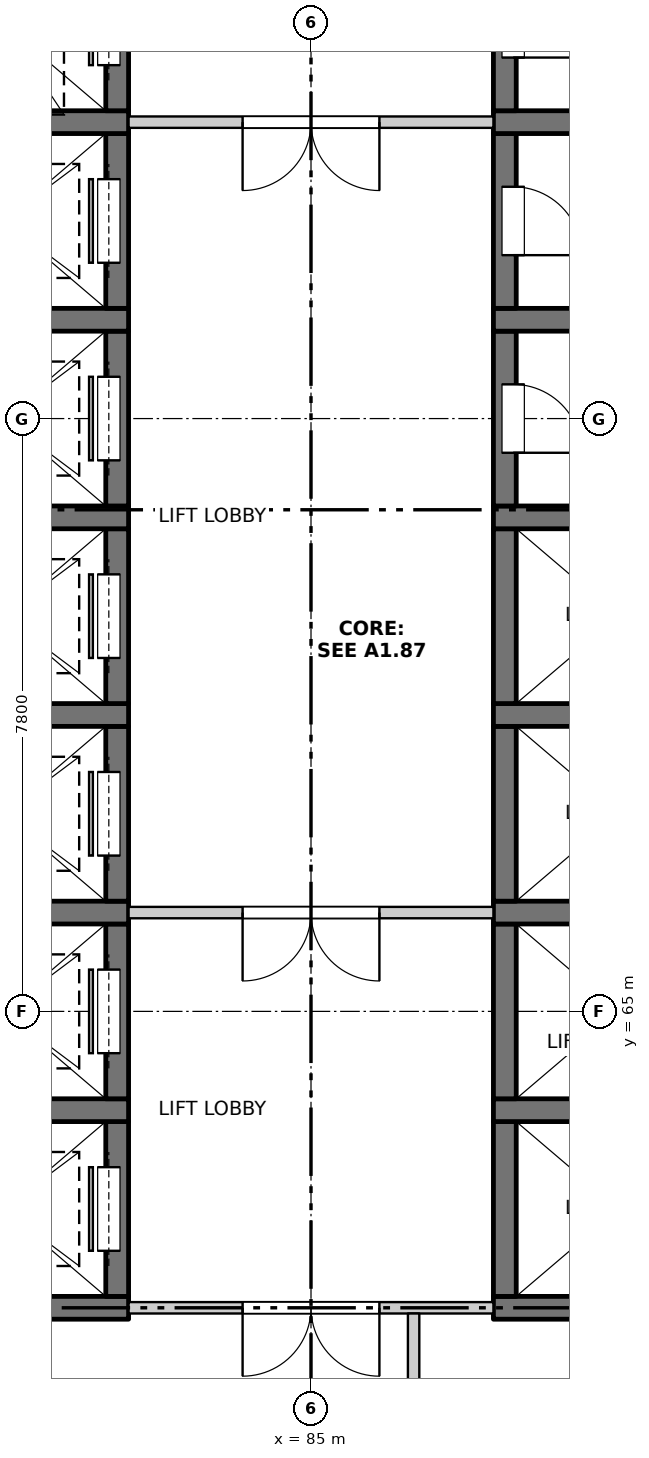
"""IFC4 building model, lengths in metres.
Left out: names, types, materials, properties, quantities, classifications, styles, units other than length and angle.
Written with IfcOpenShell. Run it as: python <this file> out.ifc"""

import sys

from ifc_helpers import new_model, si_unit, direction, frame, frame_2d, origin, place, context, subcontext, project, spatial, rectangle, extrude, element, fill, save


model = new_model("IFC4")
c1 = context("Model", 3, precision=1e-05, world=origin(), true_north=direction((0.0, 1.0)))
c2 = subcontext(c1, "Body", "Model", "MODEL_VIEW")
j1 = project(units=[si_unit("LENGTHUNIT", "METRE"), si_unit("PLANEANGLEUNIT", "RADIAN")], contexts=[c1])
p1 = place(None, origin())
s1 = spatial("IfcSite", under=j1, at=p1, CompositionType="ELEMENT")
p2 = place(p1, origin())
s2 = spatial("IfcBuilding", under=s1, at=p2, CompositionType="ELEMENT")
p3 = place(p2, frame((0.0, 0.0, 123.7)))
s3 = spatial("IfcBuildingStorey", under=s2, at=p3, CompositionType="ELEMENT", Elevation=123.7)
p4 = place(p3, frame((79.6, 61.1, -0.3), z_axis=(0.0, 0.0, 1.0), x_axis=(1.0, 0.0, 0.0)))
e1 = element("IfcWall", 1, at=p4, inside=s3, PredefinedType="SOLIDWALL", context=c2, shape_type="SweptSolid", body=[
    extrude(rectangle(XDim=3.0, YDim=0.3, at=frame_2d((1.5, 0.0))), origin(), (0.0, 0.0, 1.0), 3.45),
])
p5 = place(p3, frame((82.45, 61.25, -0.3), z_axis=(0.0, 0.0, 1.0), x_axis=(0.0, 1.0, 0.0)))
e2 = element("IfcWall", 2, at=p5, inside=s3, PredefinedType="SOLIDWALL", context=c2, shape_type="SweptSolid", body=[
    extrude(rectangle(XDim=2.3, YDim=0.3, at=frame_2d((1.15, 0.0))), origin(), (0.0, 0.0, 1.0), 3.45),
])
p6 = place(p5, frame((0.6, 0.0, 0.3)))
e3 = element("IfcOpeningElement", 3, at=p6, cuts=e2, PredefinedType="OPENING", context=c2, shape_type="SweptSolid", body=[
    extrude(rectangle(XDim=1.1, YDim=2.1, at=frame_2d((0.55, 1.05))), frame((0.0, 0.16, 0.0), z_axis=(0.0, -1.0, 0.0), x_axis=(1.0, 0.0, 0.0)), (0.0, 0.0, 1.0), 0.32),
])
p7 = place(p3, frame((79.6, 63.7, -0.3), z_axis=(0.0, 0.0, 1.0), x_axis=(1.0, 0.0, 0.0)))
e4 = element("IfcWall", 4, at=p7, inside=s3, PredefinedType="SOLIDWALL", context=c2, shape_type="SweptSolid", body=[
    extrude(rectangle(XDim=3.0, YDim=0.3, at=frame_2d((1.5, 0.0))), origin(), (0.0, 0.0, 1.0), 3.45),
])
p8 = place(p3, frame((82.45, 63.85, -0.3), z_axis=(0.0, 0.0, 1.0), x_axis=(0.0, 1.0, 0.0)))
e5 = element("IfcWall", 5, at=p8, inside=s3, PredefinedType="SOLIDWALL", context=c2, shape_type="SweptSolid", body=[
    extrude(rectangle(XDim=2.3, YDim=0.3, at=frame_2d((1.15, 0.0))), origin(), (0.0, 0.0, 1.0), 3.45),
])
p9 = place(p8, frame((0.6, 0.0, 0.3)))
e6 = element("IfcOpeningElement", 6, at=p9, cuts=e5, PredefinedType="OPENING", context=c2, shape_type="SweptSolid", body=[
    extrude(rectangle(XDim=1.1, YDim=2.1, at=frame_2d((0.55, 1.05))), frame((0.0, 0.16, 0.0), z_axis=(0.0, -1.0, 0.0), x_axis=(1.0, 0.0, 0.0)), (0.0, 0.0, 1.0), 0.32),
])
p10 = place(p3, frame((79.6, 66.3, -0.3), z_axis=(0.0, 0.0, 1.0), x_axis=(1.0, 0.0, 0.0)))
e7 = element("IfcWall", 7, at=p10, inside=s3, PredefinedType="SOLIDWALL", context=c2, shape_type="SweptSolid", body=[
    extrude(rectangle(XDim=3.0, YDim=0.3, at=frame_2d((1.5, 0.0))), origin(), (0.0, 0.0, 1.0), 3.45),
])
p11 = place(p3, frame((82.45, 66.45, -0.3), z_axis=(0.0, 0.0, 1.0), x_axis=(0.0, 1.0, 0.0)))
e8 = element("IfcWall", 8, at=p11, inside=s3, PredefinedType="SOLIDWALL", context=c2, shape_type="SweptSolid", body=[
    extrude(rectangle(XDim=2.3, YDim=0.3, at=frame_2d((1.15, 0.0))), origin(), (0.0, 0.0, 1.0), 3.45),
])
p12 = place(p11, frame((0.6, 0.0, 0.3)))
e9 = element("IfcOpeningElement", 9, at=p12, cuts=e8, PredefinedType="OPENING", context=c2, shape_type="SweptSolid", body=[
    extrude(rectangle(XDim=1.1, YDim=2.1, at=frame_2d((0.55, 1.05))), frame((0.0, 0.16, 0.0), z_axis=(0.0, -1.0, 0.0), x_axis=(1.0, 0.0, 0.0)), (0.0, 0.0, 1.0), 0.32),
])
p13 = place(p3, frame((79.6, 68.9, -0.3), z_axis=(0.0, 0.0, 1.0), x_axis=(1.0, 0.0, 0.0)))
e10 = element("IfcWall", 10, at=p13, inside=s3, PredefinedType="SOLIDWALL", context=c2, shape_type="SweptSolid", body=[
    extrude(rectangle(XDim=3.0, YDim=0.3, at=frame_2d((1.5, 0.0))), origin(), (0.0, 0.0, 1.0), 3.45),
])
p14 = place(p3, frame((82.45, 69.05, -0.3), z_axis=(0.0, 0.0, 1.0), x_axis=(0.0, 1.0, 0.0)))
e11 = element("IfcWall", 11, at=p14, inside=s3, PredefinedType="SOLIDWALL", context=c2, shape_type="SweptSolid", body=[
    extrude(rectangle(XDim=2.3, YDim=0.3, at=frame_2d((1.15, 0.0))), origin(), (0.0, 0.0, 1.0), 3.45),
])
p15 = place(p14, frame((0.6, 0.0, 0.3)))
e12 = element("IfcOpeningElement", 12, at=p15, cuts=e11, PredefinedType="OPENING", context=c2, shape_type="SweptSolid", body=[
    extrude(rectangle(XDim=1.1, YDim=2.1, at=frame_2d((0.55, 1.05))), frame((0.0, 0.16, 0.0), z_axis=(0.0, -1.0, 0.0), x_axis=(1.0, 0.0, 0.0)), (0.0, 0.0, 1.0), 0.32),
])
p16 = place(p3, frame((79.6, 71.5, -0.3), z_axis=(0.0, 0.0, 1.0), x_axis=(1.0, 0.0, 0.0)))
e13 = element("IfcWall", 13, at=p16, inside=s3, PredefinedType="SOLIDWALL", context=c2, shape_type="SweptSolid", body=[
    extrude(rectangle(XDim=3.0, YDim=0.3, at=frame_2d((1.5, 0.0))), origin(), (0.0, 0.0, 1.0), 3.45),
])
p17 = place(p3, frame((82.45, 71.65, -0.3), z_axis=(0.0, 0.0, 1.0), x_axis=(0.0, 1.0, 0.0)))
e14 = element("IfcWall", 14, at=p17, inside=s3, PredefinedType="SOLIDWALL", context=c2, shape_type="SweptSolid", body=[
    extrude(rectangle(XDim=2.3, YDim=0.3, at=frame_2d((1.15, 0.0))), origin(), (0.0, 0.0, 1.0), 3.45),
])
p18 = place(p17, frame((0.6, 0.0, 0.3)))
e15 = element("IfcOpeningElement", 15, at=p18, cuts=e14, PredefinedType="OPENING", context=c2, shape_type="SweptSolid", body=[
    extrude(rectangle(XDim=1.1, YDim=2.1, at=frame_2d((0.55, 1.05))), frame((0.0, 0.16, 0.0), z_axis=(0.0, -1.0, 0.0), x_axis=(1.0, 0.0, 0.0)), (0.0, 0.0, 1.0), 0.32),
])
p19 = place(p3, frame((79.6, 74.1, -0.3), z_axis=(0.0, 0.0, 1.0), x_axis=(1.0, 0.0, 0.0)))
e16 = element("IfcWall", 16, at=p19, inside=s3, PredefinedType="SOLIDWALL", context=c2, shape_type="SweptSolid", body=[
    extrude(rectangle(XDim=3.0, YDim=0.3, at=frame_2d((1.5, 0.0))), origin(), (0.0, 0.0, 1.0), 3.45),
])
p20 = place(p3, frame((82.45, 74.25, -0.3), z_axis=(0.0, 0.0, 1.0), x_axis=(0.0, 1.0, 0.0)))
e17 = element("IfcWall", 17, at=p20, inside=s3, PredefinedType="SOLIDWALL", context=c2, shape_type="SweptSolid", body=[
    extrude(rectangle(XDim=2.3, YDim=0.3, at=frame_2d((1.15, 0.0))), origin(), (0.0, 0.0, 1.0), 3.45),
])
p21 = place(p20, frame((0.6, 0.0, 0.3)))
e18 = element("IfcOpeningElement", 18, at=p21, cuts=e17, PredefinedType="OPENING", context=c2, shape_type="SweptSolid", body=[
    extrude(rectangle(XDim=1.1, YDim=2.1, at=frame_2d((0.55, 1.05))), frame((0.0, 0.16, 0.0), z_axis=(0.0, -1.0, 0.0), x_axis=(1.0, 0.0, 0.0)), (0.0, 0.0, 1.0), 0.32),
])
p22 = place(p3, frame((79.6, 76.7, -0.3), z_axis=(0.0, 0.0, 1.0), x_axis=(1.0, 0.0, 0.0)))
e19 = element("IfcWall", 19, at=p22, inside=s3, PredefinedType="SOLIDWALL", context=c2, shape_type="SweptSolid", body=[
    extrude(rectangle(XDim=3.0, YDim=0.3, at=frame_2d((1.5, 0.0))), origin(), (0.0, 0.0, 1.0), 3.45),
])
p23 = place(p3, frame((82.45, 76.85, -0.3), z_axis=(0.0, 0.0, 1.0), x_axis=(0.0, 1.0, 0.0)))
e20 = element("IfcWall", 20, at=p23, inside=s3, PredefinedType="SOLIDWALL", context=c2, shape_type="SweptSolid", body=[
    extrude(rectangle(XDim=2.3, YDim=0.3, at=frame_2d((1.15, 0.0))), origin(), (0.0, 0.0, 1.0), 3.45),
])
p24 = place(p23, frame((0.6, 0.0, 0.3)))
e21 = element("IfcOpeningElement", 21, at=p24, cuts=e20, PredefinedType="OPENING", context=c2, shape_type="SweptSolid", body=[
    extrude(rectangle(XDim=1.1, YDim=2.1, at=frame_2d((0.55, 1.05))), frame((0.0, 0.16, 0.0), z_axis=(0.0, -1.0, 0.0), x_axis=(1.0, 0.0, 0.0)), (0.0, 0.0, 1.0), 0.32),
])
p25 = place(p3, frame((87.4, 61.1, -0.3), z_axis=(0.0, 0.0, 1.0), x_axis=(1.0, 0.0, 0.0)))
e22 = element("IfcWall", 22, at=p25, inside=s3, PredefinedType="SOLIDWALL", context=c2, shape_type="SweptSolid", body=[
    extrude(rectangle(XDim=3.0, YDim=0.3, at=frame_2d((1.5, 0.0))), origin(), (0.0, 0.0, 1.0), 3.45),
])
p26 = place(p3, frame((87.55, 61.25, -0.3), z_axis=(0.0, 0.0, 1.0), x_axis=(0.0, 1.0, 0.0)))
e23 = element("IfcWall", 23, at=p26, inside=s3, PredefinedType="SOLIDWALL", context=c2, shape_type="SweptSolid", body=[
    extrude(rectangle(XDim=2.3, YDim=0.3, at=frame_2d((1.15, 0.0))), origin(), (0.0, 0.0, 1.0), 3.45),
])
p27 = place(p3, frame((87.4, 63.7, -0.3), z_axis=(0.0, 0.0, 1.0), x_axis=(1.0, 0.0, 0.0)))
e24 = element("IfcWall", 24, at=p27, inside=s3, PredefinedType="SOLIDWALL", context=c2, shape_type="SweptSolid", body=[
    extrude(rectangle(XDim=3.0, YDim=0.3, at=frame_2d((1.5, 0.0))), origin(), (0.0, 0.0, 1.0), 3.45),
])
p28 = place(p3, frame((87.55, 63.85, -0.3), z_axis=(0.0, 0.0, 1.0), x_axis=(0.0, 1.0, 0.0)))
e25 = element("IfcWall", 25, at=p28, inside=s3, PredefinedType="SOLIDWALL", context=c2, shape_type="SweptSolid", body=[
    extrude(rectangle(XDim=2.3, YDim=0.3, at=frame_2d((1.15, 0.0))), origin(), (0.0, 0.0, 1.0), 3.45),
])
p29 = place(p3, frame((87.4, 66.3, -0.3), z_axis=(0.0, 0.0, 1.0), x_axis=(1.0, 0.0, 0.0)))
e26 = element("IfcWall", 26, at=p29, inside=s3, PredefinedType="SOLIDWALL", context=c2, shape_type="SweptSolid", body=[
    extrude(rectangle(XDim=3.0, YDim=0.3, at=frame_2d((1.5, 0.0))), origin(), (0.0, 0.0, 1.0), 3.45),
])
p30 = place(p3, frame((87.55, 66.45, -0.3), z_axis=(0.0, 0.0, 1.0), x_axis=(0.0, 1.0, 0.0)))
e27 = element("IfcWall", 27, at=p30, inside=s3, PredefinedType="SOLIDWALL", context=c2, shape_type="SweptSolid", body=[
    extrude(rectangle(XDim=2.3, YDim=0.3, at=frame_2d((1.15, 0.0))), origin(), (0.0, 0.0, 1.0), 3.45),
])
p31 = place(p3, frame((87.4, 68.9, -0.3), z_axis=(0.0, 0.0, 1.0), x_axis=(1.0, 0.0, 0.0)))
e28 = element("IfcWall", 28, at=p31, inside=s3, PredefinedType="SOLIDWALL", context=c2, shape_type="SweptSolid", body=[
    extrude(rectangle(XDim=3.0, YDim=0.3, at=frame_2d((1.5, 0.0))), origin(), (0.0, 0.0, 1.0), 3.45),
])
p32 = place(p3, frame((87.55, 69.05, -0.3), z_axis=(0.0, 0.0, 1.0), x_axis=(0.0, 1.0, 0.0)))
e29 = element("IfcWall", 29, at=p32, inside=s3, PredefinedType="SOLIDWALL", context=c2, shape_type="SweptSolid", body=[
    extrude(rectangle(XDim=2.3, YDim=0.3, at=frame_2d((1.15, 0.0))), origin(), (0.0, 0.0, 1.0), 3.45),
])
p33 = place(p3, frame((87.4, 71.5, -0.3), z_axis=(0.0, 0.0, 1.0), x_axis=(1.0, 0.0, 0.0)))
e30 = element("IfcWall", 30, at=p33, inside=s3, PredefinedType="SOLIDWALL", context=c2, shape_type="SweptSolid", body=[
    extrude(rectangle(XDim=3.0, YDim=0.3, at=frame_2d((1.5, 0.0))), origin(), (0.0, 0.0, 1.0), 3.45),
])
p34 = place(p3, frame((87.55, 71.65, -0.3), z_axis=(0.0, 0.0, 1.0), x_axis=(0.0, 1.0, 0.0)))
e31 = element("IfcWall", 31, at=p34, inside=s3, PredefinedType="SOLIDWALL", context=c2, shape_type="SweptSolid", body=[
    extrude(rectangle(XDim=2.3, YDim=0.3, at=frame_2d((1.15, 0.0))), origin(), (0.0, 0.0, 1.0), 3.45),
])
p35 = place(p34, frame((0.7, 0.0, 0.3)))
e32 = element("IfcOpeningElement", 32, at=p35, cuts=e31, PredefinedType="OPENING", context=c2, shape_type="SweptSolid", body=[
    extrude(rectangle(XDim=0.9, YDim=2.1, at=frame_2d((0.45, 1.05))), frame((0.0, 0.16, 0.0), z_axis=(0.0, -1.0, 0.0), x_axis=(1.0, 0.0, 0.0)), (0.0, 0.0, 1.0), 0.32),
])
p36 = place(p3, frame((87.4, 74.1, -0.3), z_axis=(0.0, 0.0, 1.0), x_axis=(1.0, 0.0, 0.0)))
e33 = element("IfcWall", 33, at=p36, inside=s3, PredefinedType="SOLIDWALL", context=c2, shape_type="SweptSolid", body=[
    extrude(rectangle(XDim=3.0, YDim=0.3, at=frame_2d((1.5, 0.0))), origin(), (0.0, 0.0, 1.0), 3.45),
])
p37 = place(p3, frame((87.55, 74.25, -0.3), z_axis=(0.0, 0.0, 1.0), x_axis=(0.0, 1.0, 0.0)))
e34 = element("IfcWall", 34, at=p37, inside=s3, PredefinedType="SOLIDWALL", context=c2, shape_type="SweptSolid", body=[
    extrude(rectangle(XDim=2.3, YDim=0.3, at=frame_2d((1.15, 0.0))), origin(), (0.0, 0.0, 1.0), 3.45),
])
p38 = place(p37, frame((0.7, 0.0, 0.3)))
e35 = element("IfcOpeningElement", 35, at=p38, cuts=e34, PredefinedType="OPENING", context=c2, shape_type="SweptSolid", body=[
    extrude(rectangle(XDim=0.9, YDim=2.1, at=frame_2d((0.45, 1.05))), frame((0.0, 0.16, 0.0), z_axis=(0.0, -1.0, 0.0), x_axis=(1.0, 0.0, 0.0)), (0.0, 0.0, 1.0), 0.32),
])
p39 = place(p3, frame((87.4, 76.7, -0.3), z_axis=(0.0, 0.0, 1.0), x_axis=(1.0, 0.0, 0.0)))
e36 = element("IfcWall", 36, at=p39, inside=s3, PredefinedType="SOLIDWALL", context=c2, shape_type="SweptSolid", body=[
    extrude(rectangle(XDim=3.0, YDim=0.3, at=frame_2d((1.5, 0.0))), origin(), (0.0, 0.0, 1.0), 3.45),
])
p40 = place(p3, frame((87.55, 76.85, -0.3), z_axis=(0.0, 0.0, 1.0), x_axis=(0.0, 1.0, 0.0)))
e37 = element("IfcWall", 37, at=p40, inside=s3, PredefinedType="SOLIDWALL", context=c2, shape_type="SweptSolid", body=[
    extrude(rectangle(XDim=2.3, YDim=0.3, at=frame_2d((1.15, 0.0))), origin(), (0.0, 0.0, 1.0), 3.45),
])
p41 = place(p40, frame((0.7, 0.0, 0.3)))
e38 = element("IfcOpeningElement", 38, at=p41, cuts=e37, PredefinedType="OPENING", context=c2, shape_type="SweptSolid", body=[
    extrude(rectangle(XDim=0.9, YDim=2.1, at=frame_2d((0.45, 1.05))), frame((0.0, 0.16, 0.0), z_axis=(0.0, -1.0, 0.0), x_axis=(1.0, 0.0, 0.0)), (0.0, 0.0, 1.0), 0.32),
])
p42 = place(p3, frame((82.6, 61.1, 0.0), z_axis=(0.0, 0.0, 1.0), x_axis=(1.0, 0.0, 0.0)))
e39 = element("IfcWall", 39, at=p42, inside=s3, PredefinedType="PARTITIONING", context=c2, shape_type="SweptSolid", body=[
    extrude(rectangle(XDim=4.8, YDim=0.15, at=frame_2d((2.4, 0.0))), origin(), (0.0, 0.0, 1.0), 3.15),
])
p43 = place(p42, frame((1.5, 0.0, 0.0)))
e40 = element("IfcOpeningElement", 40, at=p43, cuts=e39, PredefinedType="OPENING", context=c2, shape_type="SweptSolid", body=[
    extrude(rectangle(XDim=1.8, YDim=2.1, at=frame_2d((0.9, 1.05))), frame((0.0, 0.085, 0.0), z_axis=(0.0, -1.0, 0.0), x_axis=(1.0, 0.0, 0.0)), (0.0, 0.0, 1.0), 0.17),
])
p44 = place(p3, frame((82.6, 66.3, 0.0), z_axis=(0.0, 0.0, 1.0), x_axis=(1.0, 0.0, 0.0)))
e41 = element("IfcWall", 41, at=p44, inside=s3, PredefinedType="PARTITIONING", context=c2, shape_type="SweptSolid", body=[
    extrude(rectangle(XDim=4.8, YDim=0.15, at=frame_2d((2.4, 0.0))), origin(), (0.0, 0.0, 1.0), 3.15),
])
p45 = place(p44, frame((1.5, 0.0, 0.0)))
e42 = element("IfcOpeningElement", 42, at=p45, cuts=e41, PredefinedType="OPENING", context=c2, shape_type="SweptSolid", body=[
    extrude(rectangle(XDim=1.8, YDim=2.1, at=frame_2d((0.9, 1.05))), frame((0.0, 0.085, 0.0), z_axis=(0.0, -1.0, 0.0), x_axis=(1.0, 0.0, 0.0)), (0.0, 0.0, 1.0), 0.17),
])
p46 = place(p3, frame((82.6, 76.7, 0.0), z_axis=(0.0, 0.0, 1.0), x_axis=(1.0, 0.0, 0.0)))
e43 = element("IfcWall", 43, at=p46, inside=s3, PredefinedType="PARTITIONING", context=c2, shape_type="SweptSolid", body=[
    extrude(rectangle(XDim=4.8, YDim=0.15, at=frame_2d((2.4, 0.0))), origin(), (0.0, 0.0, 1.0), 3.15),
])
p47 = place(p46, frame((1.5, 0.0, 0.0)))
e44 = element("IfcOpeningElement", 44, at=p47, cuts=e43, PredefinedType="OPENING", context=c2, shape_type="SweptSolid", body=[
    extrude(rectangle(XDim=1.8, YDim=2.1, at=frame_2d((0.9, 1.05))), frame((0.0, 0.085, 0.0), z_axis=(0.0, -1.0, 0.0), x_axis=(1.0, 0.0, 0.0)), (0.0, 0.0, 1.0), 0.17),
])
p48 = place(p3, frame((86.35, 55.525, 0.0), z_axis=(0.0, 0.0, 1.0), x_axis=(0.0, 1.0, 0.0)))
e45 = element("IfcWall", 45, at=p48, inside=s3, PredefinedType="PARTITIONING", context=c2, shape_type="SweptSolid", body=[
    extrude(rectangle(XDim=5.5, YDim=0.15, at=frame_2d((2.75, 0.0))), origin(), (0.0, 0.0, 1.0), 3.15),
])
p49 = place(p48, frame((2.175, 0.0, 0.0)))
e46 = element("IfcOpeningElement", 46, at=p49, cuts=e45, PredefinedType="OPENING", context=c2, shape_type="SweptSolid", body=[
    extrude(rectangle(XDim=0.9, YDim=2.1, at=frame_2d((0.45, 1.05))), frame((0.0, 0.085, 0.0), z_axis=(0.0, -1.0, 0.0), x_axis=(1.0, 0.0, 0.0)), (0.0, 0.0, 1.0), 0.17),
])
p50 = place(p43, origin())
e47 = element("IfcDoor", 47, at=p50, inside=s3, OperationType="DOUBLE_DOOR_SINGLE_SWING", PredefinedType="DOOR", context=c2, shape_type="SweptSolid", body=[
    extrude(rectangle(XDim=1.8, YDim=2.1, at=frame_2d((0.9, 1.05))), frame((0.0, 0.025, 0.0), z_axis=(0.0, -1.0, 0.0), x_axis=(1.0, 0.0, 0.0)), (0.0, 0.0, 1.0), 0.05),
])
fill(e40, e47)
p51 = place(p6, origin())
e48 = element("IfcDoor", 48, at=p51, inside=s3, OperationType="SLIDING_TO_RIGHT", PredefinedType="DOOR", context=c2, shape_type="SweptSolid", body=[
    extrude(rectangle(XDim=1.1, YDim=2.1, at=frame_2d((0.55, 1.05))), frame((0.0, 0.135, 0.0), z_axis=(0.0, -1.0, 0.0), x_axis=(1.0, 0.0, 0.0)), (0.0, 0.0, 1.0), 0.05),
])
fill(e3, e48)
p52 = place(p9, origin())
e49 = element("IfcDoor", 49, at=p52, inside=s3, OperationType="SLIDING_TO_RIGHT", PredefinedType="DOOR", context=c2, shape_type="SweptSolid", body=[
    extrude(rectangle(XDim=1.1, YDim=2.1, at=frame_2d((0.55, 1.05))), frame((0.0, 0.135, 0.0), z_axis=(0.0, -1.0, 0.0), x_axis=(1.0, 0.0, 0.0)), (0.0, 0.0, 1.0), 0.05),
])
fill(e6, e49)
p53 = place(p45, origin())
e50 = element("IfcDoor", 50, at=p53, inside=s3, OperationType="DOUBLE_DOOR_SINGLE_SWING", PredefinedType="DOOR", context=c2, shape_type="SweptSolid", body=[
    extrude(rectangle(XDim=1.8, YDim=2.1, at=frame_2d((0.9, 1.05))), frame((0.0, 0.025, 0.0), z_axis=(0.0, -1.0, 0.0), x_axis=(1.0, 0.0, 0.0)), (0.0, 0.0, 1.0), 0.05),
])
fill(e42, e50)
p54 = place(p12, origin())
e51 = element("IfcDoor", 51, at=p54, inside=s3, OperationType="SLIDING_TO_RIGHT", PredefinedType="DOOR", context=c2, shape_type="SweptSolid", body=[
    extrude(rectangle(XDim=1.1, YDim=2.1, at=frame_2d((0.55, 1.05))), frame((0.0, 0.135, 0.0), z_axis=(0.0, -1.0, 0.0), x_axis=(1.0, 0.0, 0.0)), (0.0, 0.0, 1.0), 0.05),
])
fill(e9, e51)
p55 = place(p15, origin())
e52 = element("IfcDoor", 52, at=p55, inside=s3, OperationType="SLIDING_TO_LEFT", PredefinedType="DOOR", context=c2, shape_type="SweptSolid", body=[
    extrude(rectangle(XDim=1.1, YDim=2.1, at=frame_2d((0.55, 1.05))), frame((0.0, 0.135, 0.0), z_axis=(0.0, -1.0, 0.0), x_axis=(1.0, 0.0, 0.0)), (0.0, 0.0, 1.0), 0.05),
])
fill(e12, e52)
p56 = place(p18, origin())
e53 = element("IfcDoor", 53, at=p56, inside=s3, OperationType="SLIDING_TO_LEFT", PredefinedType="DOOR", context=c2, shape_type="SweptSolid", body=[
    extrude(rectangle(XDim=1.1, YDim=2.1, at=frame_2d((0.55, 1.05))), frame((0.0, 0.135, 0.0), z_axis=(0.0, -1.0, 0.0), x_axis=(1.0, 0.0, 0.0)), (0.0, 0.0, 1.0), 0.05),
])
fill(e15, e53)
p57 = place(p35, origin())
e54 = element("IfcDoor", 54, at=p57, inside=s3, OperationType="SINGLE_SWING_RIGHT", PredefinedType="DOOR", context=c2, shape_type="SweptSolid", body=[
    extrude(rectangle(XDim=0.9, YDim=2.1, at=frame_2d((0.45, 1.05))), frame((0.0, -0.085, 0.0), z_axis=(0.0, -1.0, 0.0), x_axis=(1.0, 0.0, 0.0)), (0.0, 0.0, 1.0), 0.05),
])
fill(e32, e54)
p58 = place(p21, origin())
e55 = element("IfcDoor", 55, at=p58, inside=s3, OperationType="SLIDING_TO_LEFT", PredefinedType="DOOR", context=c2, shape_type="SweptSolid", body=[
    extrude(rectangle(XDim=1.1, YDim=2.1, at=frame_2d((0.55, 1.05))), frame((0.0, 0.135, 0.0), z_axis=(0.0, -1.0, 0.0), x_axis=(1.0, 0.0, 0.0)), (0.0, 0.0, 1.0), 0.05),
])
fill(e18, e55)
p59 = place(p38, origin())
e56 = element("IfcDoor", 56, at=p59, inside=s3, OperationType="SINGLE_SWING_RIGHT", PredefinedType="DOOR", context=c2, shape_type="SweptSolid", body=[
    extrude(rectangle(XDim=0.9, YDim=2.1, at=frame_2d((0.45, 1.05))), frame((0.0, -0.085, 0.0), z_axis=(0.0, -1.0, 0.0), x_axis=(1.0, 0.0, 0.0)), (0.0, 0.0, 1.0), 0.05),
])
fill(e35, e56)
p60 = place(p47, origin())
e57 = element("IfcDoor", 57, at=p60, inside=s3, OperationType="DOUBLE_DOOR_SINGLE_SWING", PredefinedType="DOOR", context=c2, shape_type="SweptSolid", body=[
    extrude(rectangle(XDim=1.8, YDim=2.1, at=frame_2d((0.9, 1.05))), frame((0.0, 0.025, 0.0), z_axis=(0.0, -1.0, 0.0), x_axis=(1.0, 0.0, 0.0)), (0.0, 0.0, 1.0), 0.05),
])
fill(e44, e57)
p61 = place(p24, origin())
e58 = element("IfcDoor", 58, at=p61, inside=s3, OperationType="SLIDING_TO_LEFT", PredefinedType="DOOR", context=c2, shape_type="SweptSolid", body=[
    extrude(rectangle(XDim=1.1, YDim=2.1, at=frame_2d((0.55, 1.05))), frame((0.0, 0.135, 0.0), z_axis=(0.0, -1.0, 0.0), x_axis=(1.0, 0.0, 0.0)), (0.0, 0.0, 1.0), 0.05),
])
fill(e21, e58)
p62 = place(p41, origin())
e59 = element("IfcDoor", 59, at=p62, inside=s3, OperationType="SINGLE_SWING_RIGHT", PredefinedType="DOOR", context=c2, shape_type="SweptSolid", body=[
    extrude(rectangle(XDim=0.9, YDim=2.1, at=frame_2d((0.45, 1.05))), frame((0.0, -0.085, 0.0), z_axis=(0.0, -1.0, 0.0), x_axis=(1.0, 0.0, 0.0)), (0.0, 0.0, 1.0), 0.05),
])
fill(e38, e59)
save(model, sys.argv[1])
